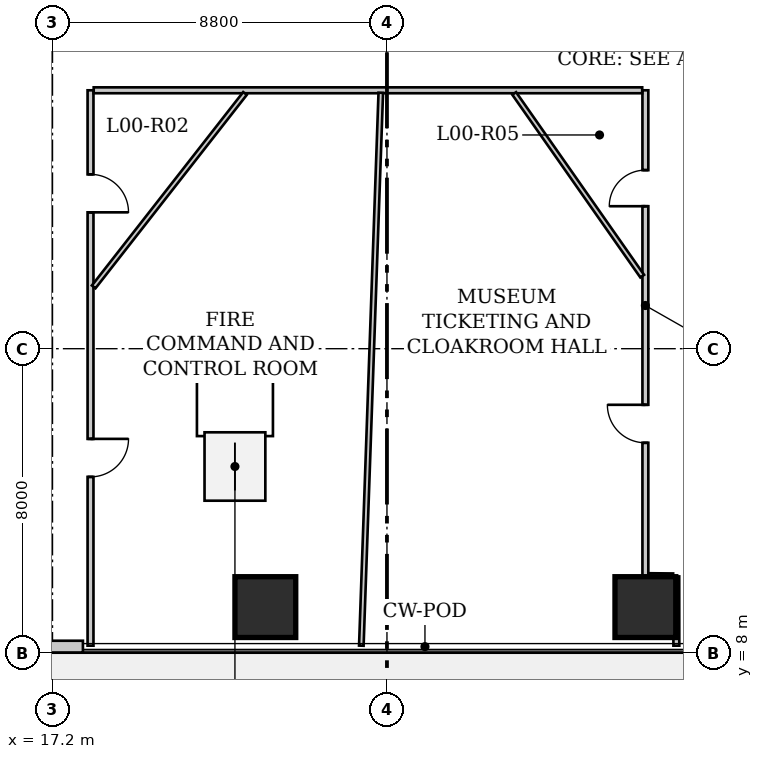
"""IFC4 building model, lengths in metres.
Left out: names, types, materials, properties, quantities, classifications, styles, units other than length and angle.
Written with IfcOpenShell. Run it as: python <this file> out.ifc"""

import sys

from ifc_helpers import new_model, si_unit, direction, frame, frame_2d, origin, origin_2d, place, context, subcontext, project, spatial, rectangle, extrude, source, transform, mapped, element, fill, save


model = new_model("IFC4")
c1 = context("Model", 3, precision=1e-05, world=origin(), true_north=direction((0.0, 1.0)))
c2 = subcontext(c1, "Body", "Model", "MODEL_VIEW")
j1 = project(units=[si_unit("LENGTHUNIT", "METRE"), si_unit("PLANEANGLEUNIT", "RADIAN")], contexts=[c1])
p1 = place(None, origin())
s1 = spatial("IfcSite", under=j1, at=p1, CompositionType="ELEMENT")
p2 = place(p1, origin())
s2 = spatial("IfcBuilding", under=s1, at=p2, CompositionType="ELEMENT")
p3 = place(p2, origin())
s3 = spatial("IfcBuildingStorey", under=s2, at=p3, CompositionType="ELEMENT", Elevation=0.0)
for number, where, z_axis, x_axis in (
    (1, (22.8, 9.2, 0.0), (0.0, 0.0, 1.0), (1.0, 0.0, 0.0)),
    (2, (32.8, 9.2, 0.0), (0.0, 0.0, 1.0), (1.0, 0.0, 0.0)),
):
    element("IfcColumn", number, at=place(p3, frame(where, z_axis=z_axis, x_axis=x_axis)), inside=s3, PredefinedType="COLUMN", context=c2, shape_type="SweptSolid", body=[
        extrude(rectangle(XDim=1.6, YDim=1.6, at=origin_2d()), origin(), (0.0, 0.0, 1.0), 4.9),
    ])
p4 = place(p3, frame((18.0, 8.16, 0.0), z_axis=(0.0, 0.0, 1.0), x_axis=(-1.0, 0.0, 0.0)))
e3 = element("IfcWall", 3, at=p4, inside=s3, PredefinedType="SOLIDWALL", context=c2, shape_type="SweptSolid", body=[
    extrude(rectangle(XDim=17.84, YDim=0.31, at=frame_2d((8.92, 0.0))), origin(), (0.0, 0.0, 1.0), 4.65),
])
p5 = place(p4, frame((1.6, 0.0, 0.0)))
e4 = element("IfcOpeningElement", 4, at=p5, cuts=e3, PredefinedType="OPENING", context=c2, shape_type="SweptSolid", body=[
    extrude(rectangle(XDim=2.0, YDim=2.4, at=frame_2d((1.0, 1.2))), frame((0.0, 0.165, 0.0), z_axis=(0.0, -1.0, 0.0), x_axis=(1.0, 0.0, 0.0)), (0.0, 0.0, 1.0), 0.33),
])
p6 = place(p4, frame((11.2, 0.0, 0.0)))
e5 = element("IfcOpeningElement", 5, at=p6, cuts=e3, PredefinedType="OPENING", context=c2, shape_type="SweptSolid", body=[
    extrude(rectangle(XDim=2.0, YDim=2.4, at=frame_2d((1.0, 1.2))), frame((0.0, 0.165, 0.0), z_axis=(0.0, -1.0, 0.0), x_axis=(1.0, 0.0, 0.0)), (0.0, 0.0, 1.0), 0.33),
])
p7 = place(p3, frame((32.8, 10.015, 0.0), z_axis=(0.0, 0.0, 1.0), x_axis=(0.0, 1.0, 0.0)))
e6 = element("IfcWall", 6, at=p7, inside=s3, PredefinedType="PARTITIONING", context=c2, shape_type="SweptSolid", body=[
    extrude(rectangle(XDim=12.785, YDim=0.155, at=frame_2d((6.393, 0.0))), origin(), (0.0, 0.0, 1.0), 4.9),
])
p8 = place(p7, frame((3.509, 0.0, 0.0)))
e7 = element("IfcOpeningElement", 7, at=p8, cuts=e6, PredefinedType="OPENING", context=c2, shape_type="SweptSolid", body=[
    extrude(rectangle(XDim=1.0, YDim=2.15, at=frame_2d((0.5, 1.075))), frame((0.0, 0.087, 0.0), z_axis=(0.0, -1.0, 0.0), x_axis=(1.0, 0.0, 0.0)), (0.0, 0.0, 1.0), 0.175),
])
p9 = place(p7, frame((9.734, 0.0, 0.0)))
e8 = element("IfcOpeningElement", 8, at=p9, cuts=e6, PredefinedType="OPENING", context=c2, shape_type="SweptSolid", body=[
    extrude(rectangle(XDim=0.95, YDim=2.15, at=frame_2d((0.475, 1.075))), frame((0.0, 0.087, 0.0), z_axis=(0.0, -1.0, 0.0), x_axis=(1.0, 0.0, 0.0)), (0.0, 0.0, 1.0), 0.175),
])
p10 = place(p3, frame((18.2, 22.8, 0.0), z_axis=(0.0, 0.0, 1.0), x_axis=(0.0, -1.0, 0.0)))
e9 = element("IfcWall", 9, at=p10, inside=s3, PredefinedType="PARTITIONING", context=c2, shape_type="SweptSolid", body=[
    extrude(rectangle(XDim=14.615, YDim=0.155, at=frame_2d((7.308, 0.0))), origin(), (0.0, 0.0, 1.0), 4.9),
])
p11 = place(p10, frame((2.212, 0.0, 0.0)))
e10 = element("IfcOpeningElement", 10, at=p11, cuts=e9, PredefinedType="OPENING", context=c2, shape_type="SweptSolid", body=[
    extrude(rectangle(XDim=1.0, YDim=2.15, at=frame_2d((0.5, 1.075))), frame((0.0, 0.087, 0.0), z_axis=(0.0, -1.0, 0.0), x_axis=(1.0, 0.0, 0.0)), (0.0, 0.0, 1.0), 0.175),
])
p12 = place(p10, frame((9.173, 0.0, 0.0)))
e11 = element("IfcOpeningElement", 11, at=p12, cuts=e9, PredefinedType="OPENING", context=c2, shape_type="SweptSolid", body=[
    extrude(rectangle(XDim=1.0, YDim=2.15, at=frame_2d((0.5, 1.075))), frame((0.0, 0.087, 0.0), z_axis=(0.0, -1.0, 0.0), x_axis=(1.0, 0.0, 0.0)), (0.0, 0.0, 1.0), 0.175),
])
p13 = place(p3, frame((33.615, 8.185, 0.0), z_axis=(0.0, 0.0, 1.0), x_axis=(-0.001071954362, 0.999999425457, 0.0)))
e12 = element("IfcWall", 12, at=p13, inside=s3, PredefinedType="PARTITIONING", context=c2, shape_type="SweptSolid", body=[
    extrude(rectangle(XDim=1.822, YDim=0.155, at=frame_2d((0.911, 0.0))), origin(), (0.0, 0.0, 1.0), 4.9),
])
p14 = place(p3, frame((33.53, 10.008, 0.0), z_axis=(0.0, 0.0, 1.0), x_axis=(-0.999951763322, 0.009821966697, 0.0)))
e13 = element("IfcWall", 13, at=p14, inside=s3, PredefinedType="PARTITIONING", context=c2, shape_type="SweptSolid", body=[
    extrude(rectangle(XDim=0.646, YDim=0.155, at=frame_2d((0.323, 0.0))), origin(), (0.0, 0.0, 1.0), 4.9),
])
p15 = place(p3, frame((32.717, 22.8, 0.0), z_axis=(0.0, 0.0, 1.0), x_axis=(-1.0, 0.0, 0.0)))
e14 = element("IfcWall", 14, at=p15, inside=s3, PredefinedType="PARTITIONING", context=c2, shape_type="SweptSolid", body=[
    extrude(rectangle(XDim=14.433, YDim=0.155, at=frame_2d((7.217, 0.0))), origin(), (0.0, 0.0, 1.0), 4.9),
])
p16 = place(p3, frame((22.265, 22.717, 0.0), z_axis=(0.0, 0.0, 1.0), x_axis=(-0.616101439236, -0.787666818249, 0.0)))
e15 = element("IfcWall", 15, at=p16, inside=s3, PredefinedType="PARTITIONING", context=c2, shape_type="SweptSolid", body=[
    extrude(rectangle(XDim=6.462, YDim=0.12, at=frame_2d((3.231, 0.0))), origin(), (0.0, 0.0, 1.0), 4.9),
])
p17 = place(p3, frame((25.838, 22.735, 0.0), z_axis=(0.0, 0.0, 1.0), x_axis=(-0.035164573371, -0.99938153514, 0.0)))
e16 = element("IfcWall", 16, at=p17, inside=s3, PredefinedType="PARTITIONING", context=c2, shape_type="SweptSolid", body=[
    extrude(rectangle(XDim=14.559, YDim=0.12, at=frame_2d((7.28, 0.0))), origin(), (0.0, 0.0, 1.0), 4.9),
])
p18 = place(p3, frame((29.348, 22.717, 0.0), z_axis=(0.0, 0.0, 1.0), x_axis=(0.573805638795, -0.818991507213, 0.0)))
e17 = element("IfcWall", 17, at=p18, inside=s3, PredefinedType="PARTITIONING", context=c2, shape_type="SweptSolid", body=[
    extrude(rectangle(XDim=5.87, YDim=0.12, at=frame_2d((2.935, 0.0))), origin(), (0.0, 0.0, 1.0), 4.9),
])
m1 = source(origin(), c2, "Body", "SweptSolid", [
    extrude(rectangle(XDim=1.0, YDim=2.15, at=frame_2d((0.5, 1.075))), frame((0.0, 0.025, 0.0), z_axis=(0.0, -1.0, 0.0), x_axis=(1.0, 0.0, 0.0)), (0.0, 0.0, 1.0), 0.05),
])
p19 = place(p8, origin())
e18 = element("IfcDoor", 18, at=p19, inside=s3, OperationType="SINGLE_SWING_RIGHT", PredefinedType="DOOR", context=c2, shape_type="MappedRepresentation", body=[
    mapped(m1, transform((0.0, 0.0, 0.0), x_axis=(1.0, 0.0, 0.0), y_axis=(0.0, 1.0, 0.0), z_axis=(0.0, 0.0, 1.0), scale=1.0)),
])
fill(e7, e18)
m2 = source(origin(), c2, "Body", "SweptSolid", [
    extrude(rectangle(XDim=0.95, YDim=2.15, at=frame_2d((0.475, 1.075))), frame((0.0, 0.025, 0.0), z_axis=(0.0, -1.0, 0.0), x_axis=(1.0, 0.0, 0.0)), (0.0, 0.0, 1.0), 0.05),
])
p20 = place(p9, origin())
e19 = element("IfcDoor", 19, at=p20, inside=s3, OperationType="SINGLE_SWING_LEFT", PredefinedType="DOOR", context=c2, shape_type="MappedRepresentation", body=[
    mapped(m2, transform((0.0, 0.0, 0.0), x_axis=(1.0, 0.0, 0.0), y_axis=(0.0, 1.0, 0.0), z_axis=(0.0, 0.0, 1.0), scale=1.0)),
])
fill(e8, e19)
p21 = place(p11, origin())
e20 = element("IfcDoor", 20, at=p21, inside=s3, OperationType="SINGLE_SWING_RIGHT", PredefinedType="DOOR", context=c2, shape_type="MappedRepresentation", body=[
    mapped(m1, transform((0.0, 0.0, 0.0), x_axis=(1.0, 0.0, 0.0), y_axis=(0.0, 1.0, 0.0), z_axis=(0.0, 0.0, 1.0), scale=1.0)),
])
fill(e10, e20)
p22 = place(p12, origin())
e21 = element("IfcDoor", 21, at=p22, inside=s3, OperationType="SINGLE_SWING_LEFT", PredefinedType="DOOR", context=c2, shape_type="MappedRepresentation", body=[
    mapped(m1, transform((0.0, 0.0, 0.0), x_axis=(1.0, 0.0, 0.0), y_axis=(0.0, 1.0, 0.0), z_axis=(0.0, 0.0, 1.0), scale=1.0)),
])
fill(e11, e21)
save(model, sys.argv[1])
